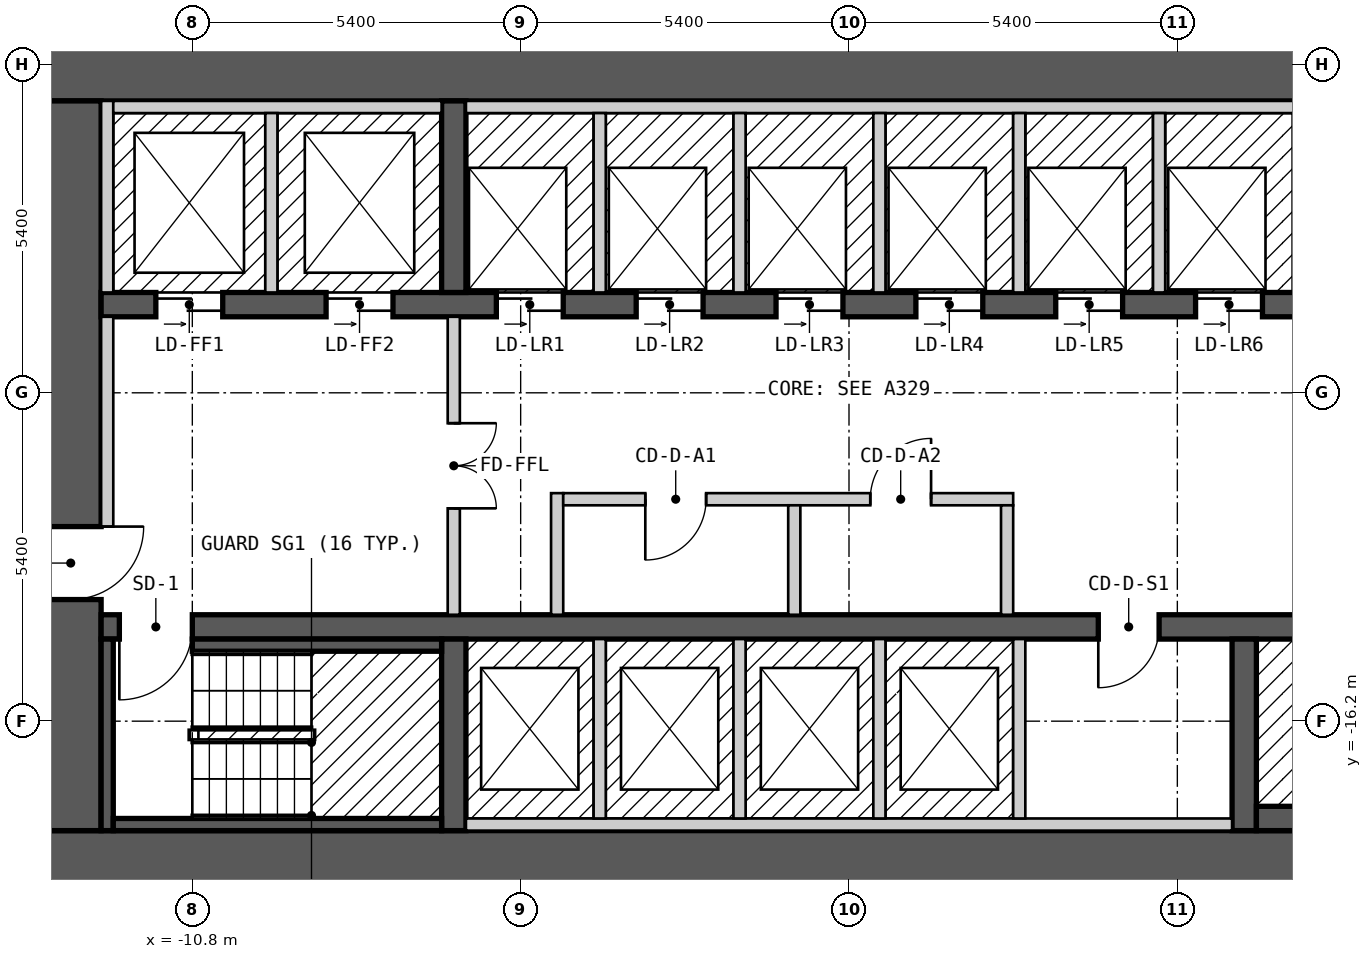
"""IFC4 building model, lengths in metres.
Left out: names, types, materials, properties, quantities, classifications, styles, units other than length and angle.
Written with IfcOpenShell. Run it as: python <this file> out.ifc"""

import sys

from ifc_helpers import new_model, si_unit, direction, frame, frame_2d, origin, place, context, subcontext, project, spatial, rectangle, extrude, element, fill, save


model = new_model("IFC4")
c1 = context("Model", 3, precision=1e-05, world=origin(), true_north=direction((0.0, 1.0)))
c2 = subcontext(c1, "Body", "Model", "MODEL_VIEW")
j1 = project(units=[si_unit("LENGTHUNIT", "METRE"), si_unit("PLANEANGLEUNIT", "RADIAN")], contexts=[c1])
p1 = place(None, origin())
s1 = spatial("IfcSite", under=j1, at=p1, CompositionType="ELEMENT")
p2 = place(p1, origin())
s2 = spatial("IfcBuilding", under=s1, at=p2, CompositionType="ELEMENT")
p3 = place(p2, frame((0.0, 0.0, 102.0)))
s3 = spatial("IfcBuildingStorey", under=s2, at=p3, CompositionType="ELEMENT", Elevation=102.0)
p4 = place(p3, frame((-13.3, -18.5, 0.0), z_axis=(0.0, 0.0, 1.0), x_axis=(1.0, 0.0, 0.0)))
e1 = element("IfcWall", 1, at=p4, inside=s3, PredefinedType="SHEAR", context=c2, shape_type="SweptSolid", body=[
    extrude(rectangle(XDim=26.6, YDim=1.0, at=frame_2d((13.3, 0.0))), origin(), (0.0, 0.0, 1.0), 2.7),
])
p5 = place(p3, frame((-13.3, -5.5, 0.0), z_axis=(0.0, 0.0, 1.0), x_axis=(1.0, 0.0, 0.0)))
e2 = element("IfcWall", 2, at=p5, inside=s3, PredefinedType="SHEAR", context=c2, shape_type="SweptSolid", body=[
    extrude(rectangle(XDim=26.6, YDim=1.0, at=frame_2d((13.3, 0.0))), origin(), (0.0, 0.0, 1.0), 2.7),
])
p6 = place(p5, frame((23.65, 0.0, 0.0)))
e3 = element("IfcOpeningElement", 3, at=p6, cuts=e2, PredefinedType="OPENING", context=c2, shape_type="SweptSolid", body=[
    extrude(rectangle(XDim=1.2, YDim=2.1, at=frame_2d((0.6, 1.05))), frame((0.0, 0.51, 0.0), z_axis=(0.0, -1.0, 0.0), x_axis=(1.0, 0.0, 0.0)), (0.0, 0.0, 1.0), 1.02),
])
p7 = place(p3, frame((-12.8, -18.0, 0.0), z_axis=(0.0, 0.0, 1.0), x_axis=(0.0, 1.0, 0.0)))
e4 = element("IfcWall", 4, at=p7, inside=s3, PredefinedType="SHEAR", context=c2, shape_type="SweptSolid", body=[
    extrude(rectangle(XDim=12.0, YDim=1.0, at=frame_2d((6.0, 0.0))), origin(), (0.0, 0.0, 1.0), 2.7),
])
p8 = place(p7, frame((3.8, 0.0, 0.0)))
e5 = element("IfcOpeningElement", 5, at=p8, cuts=e4, PredefinedType="OPENING", context=c2, shape_type="SweptSolid", body=[
    extrude(rectangle(XDim=1.2, YDim=2.1, at=frame_2d((0.6, 1.05))), frame((0.0, 0.51, 0.0), z_axis=(0.0, -1.0, 0.0), x_axis=(1.0, 0.0, 0.0)), (0.0, 0.0, 1.0), 1.02),
])
p9 = place(p3, frame((-12.3, -14.65, 0.0), z_axis=(0.0, 0.0, 1.0), x_axis=(1.0, 0.0, 0.0)))
e6 = element("IfcWall", 6, at=p9, inside=s3, PredefinedType="SHEAR", context=c2, shape_type="SweptSolid", body=[
    extrude(rectangle(XDim=24.6, YDim=0.4, at=frame_2d((12.3, 0.0))), origin(), (0.0, 0.0, 1.0), 2.7),
])
p10 = place(p9, frame((1.5, 0.0, 0.0), z_axis=(0.0, 0.0, 1.0), x_axis=(-1.0, 0.0, 0.0)))
e7 = element("IfcOpeningElement", 7, at=p10, cuts=e6, PredefinedType="OPENING", context=c2, shape_type="SweptSolid", body=[
    extrude(rectangle(XDim=1.2, YDim=2.1, at=frame_2d((0.6, 1.05))), frame((0.0, 0.21, 0.0), z_axis=(0.0, -1.0, 0.0), x_axis=(1.0, 0.0, 0.0)), (0.0, 0.0, 1.0), 0.42),
])
p11 = place(p9, frame((24.35, 0.0, 0.0), z_axis=(0.0, 0.0, 1.0), x_axis=(-1.0, 0.0, 0.0)))
e8 = element("IfcOpeningElement", 8, at=p11, cuts=e6, PredefinedType="OPENING", context=c2, shape_type="SweptSolid", body=[
    extrude(rectangle(XDim=1.2, YDim=2.1, at=frame_2d((0.6, 1.05))), frame((0.0, 0.21, 0.0), z_axis=(0.0, -1.0, 0.0), x_axis=(1.0, 0.0, 0.0)), (0.0, 0.0, 1.0), 0.42),
])
p12 = place(p9, frame((17.4, 0.0, 0.0), z_axis=(0.0, 0.0, 1.0), x_axis=(-1.0, 0.0, 0.0)))
e9 = element("IfcOpeningElement", 9, at=p12, cuts=e6, PredefinedType="OPENING", context=c2, shape_type="SweptSolid", body=[
    extrude(rectangle(XDim=1.0, YDim=2.1, at=frame_2d((0.5, 1.05))), frame((0.0, 0.21, 0.0), z_axis=(0.0, -1.0, 0.0), x_axis=(1.0, 0.0, 0.0)), (0.0, 0.0, 1.0), 0.42),
])
p13 = place(p3, frame((-12.3, -9.35, 0.0), z_axis=(0.0, 0.0, 1.0), x_axis=(1.0, 0.0, 0.0)))
e10 = element("IfcWall", 10, at=p13, inside=s3, PredefinedType="SHEAR", context=c2, shape_type="SweptSolid", body=[
    extrude(rectangle(XDim=22.5, YDim=0.4, at=frame_2d((11.25, 0.0))), origin(), (0.0, 0.0, 1.0), 2.7),
])
p14 = place(p13, frame((0.9, 0.0, 0.0)))
e11 = element("IfcOpeningElement", 11, at=p14, cuts=e10, PredefinedType="OPENING", context=c2, shape_type="SweptSolid", body=[
    extrude(rectangle(XDim=1.1, YDim=2.1, at=frame_2d((0.55, 1.05))), frame((0.0, 0.21, 0.0), z_axis=(0.0, -1.0, 0.0), x_axis=(1.0, 0.0, 0.0)), (0.0, 0.0, 1.0), 0.42),
])
p15 = place(p13, frame((3.7, 0.0, 0.0)))
e12 = element("IfcOpeningElement", 12, at=p15, cuts=e10, PredefinedType="OPENING", context=c2, shape_type="SweptSolid", body=[
    extrude(rectangle(XDim=1.1, YDim=2.1, at=frame_2d((0.55, 1.05))), frame((0.0, 0.21, 0.0), z_axis=(0.0, -1.0, 0.0), x_axis=(1.0, 0.0, 0.0)), (0.0, 0.0, 1.0), 0.42),
])
p16 = place(p13, frame((6.5, 0.0, 0.0)))
e13 = element("IfcOpeningElement", 13, at=p16, cuts=e10, PredefinedType="OPENING", context=c2, shape_type="SweptSolid", body=[
    extrude(rectangle(XDim=1.1, YDim=2.1, at=frame_2d((0.55, 1.05))), frame((0.0, 0.21, 0.0), z_axis=(0.0, -1.0, 0.0), x_axis=(1.0, 0.0, 0.0)), (0.0, 0.0, 1.0), 0.42),
])
p17 = place(p13, frame((8.8, 0.0, 0.0)))
e14 = element("IfcOpeningElement", 14, at=p17, cuts=e10, PredefinedType="OPENING", context=c2, shape_type="SweptSolid", body=[
    extrude(rectangle(XDim=1.1, YDim=2.1, at=frame_2d((0.55, 1.05))), frame((0.0, 0.21, 0.0), z_axis=(0.0, -1.0, 0.0), x_axis=(1.0, 0.0, 0.0)), (0.0, 0.0, 1.0), 0.42),
])
p18 = place(p13, frame((11.1, 0.0, 0.0)))
e15 = element("IfcOpeningElement", 15, at=p18, cuts=e10, PredefinedType="OPENING", context=c2, shape_type="SweptSolid", body=[
    extrude(rectangle(XDim=1.1, YDim=2.1, at=frame_2d((0.55, 1.05))), frame((0.0, 0.21, 0.0), z_axis=(0.0, -1.0, 0.0), x_axis=(1.0, 0.0, 0.0)), (0.0, 0.0, 1.0), 0.42),
])
p19 = place(p13, frame((13.4, 0.0, 0.0)))
e16 = element("IfcOpeningElement", 16, at=p19, cuts=e10, PredefinedType="OPENING", context=c2, shape_type="SweptSolid", body=[
    extrude(rectangle(XDim=1.1, YDim=2.1, at=frame_2d((0.55, 1.05))), frame((0.0, 0.21, 0.0), z_axis=(0.0, -1.0, 0.0), x_axis=(1.0, 0.0, 0.0)), (0.0, 0.0, 1.0), 0.42),
])
p20 = place(p13, frame((15.7, 0.0, 0.0)))
e17 = element("IfcOpeningElement", 17, at=p20, cuts=e10, PredefinedType="OPENING", context=c2, shape_type="SweptSolid", body=[
    extrude(rectangle(XDim=1.1, YDim=2.1, at=frame_2d((0.55, 1.05))), frame((0.0, 0.21, 0.0), z_axis=(0.0, -1.0, 0.0), x_axis=(1.0, 0.0, 0.0)), (0.0, 0.0, 1.0), 0.42),
])
p21 = place(p13, frame((18.0, 0.0, 0.0)))
e18 = element("IfcOpeningElement", 18, at=p21, cuts=e10, PredefinedType="OPENING", context=c2, shape_type="SweptSolid", body=[
    extrude(rectangle(XDim=1.1, YDim=2.1, at=frame_2d((0.55, 1.05))), frame((0.0, 0.21, 0.0), z_axis=(0.0, -1.0, 0.0), x_axis=(1.0, 0.0, 0.0)), (0.0, 0.0, 1.0), 0.42),
])
p22 = place(p13, frame((20.4, 0.0, 0.0)))
e19 = element("IfcOpeningElement", 19, at=p22, cuts=e10, PredefinedType="OPENING", context=c2, shape_type="SweptSolid", body=[
    extrude(rectangle(XDim=1.1, YDim=2.1, at=frame_2d((0.55, 1.05))), frame((0.0, 0.21, 0.0), z_axis=(0.0, -1.0, 0.0), x_axis=(1.0, 0.0, 0.0)), (0.0, 0.0, 1.0), 0.42),
])
for number, where, z_axis, x_axis in (
    (20, (-6.5, -18.0, 0.0), (0.0, 0.0, 1.0), (0.0, 1.0, 0.0)),
    (21, (6.5, -18.0, 0.0), (0.0, 0.0, 1.0), (0.0, 1.0, 0.0)),
    (22, (-6.5, -9.15, 0.0), (0.0, 0.0, 1.0), (0.0, 1.0, 0.0)),
):
    element("IfcWall", number, at=place(p3, frame(where, z_axis=z_axis, x_axis=x_axis)), inside=s3, PredefinedType="SHEAR", context=c2, shape_type="SweptSolid", body=[
        extrude(rectangle(XDim=3.15, YDim=0.4, at=frame_2d((1.575, 0.0))), origin(), (0.0, 0.0, 1.0), 2.7),
    ])
p23 = place(p3, frame((-12.2, -18.0, 0.0), z_axis=(0.0, 0.0, 1.0), x_axis=(0.0, 1.0, 0.0)))
e23 = element("IfcWall", 23, at=p23, inside=s3, PredefinedType="SOLIDWALL", context=c2, shape_type="SweptSolid", body=[
    extrude(rectangle(XDim=3.15, YDim=0.2, at=frame_2d((1.575, 0.0))), origin(), (0.0, 0.0, 1.0), 2.7),
])
p24 = place(p3, frame((-12.2, -13.0, 0.0), z_axis=(0.0, 0.0, 1.0), x_axis=(0.0, 1.0, 0.0)))
e24 = element("IfcWall", 24, at=p24, inside=s3, PredefinedType="PARTITIONING", context=c2, shape_type="SweptSolid", body=[
    extrude(rectangle(XDim=3.45, YDim=0.2, at=frame_2d((1.725, 0.0))), origin(), (0.0, 0.0, 1.0), 2.7),
])
p25 = place(p3, frame((-12.2, -9.15, 0.0), z_axis=(0.0, 0.0, 1.0), x_axis=(0.0, 1.0, 0.0)))
e25 = element("IfcWall", 25, at=p25, inside=s3, PredefinedType="SOLIDWALL", context=c2, shape_type="SweptSolid", body=[
    extrude(rectangle(XDim=3.15, YDim=0.2, at=frame_2d((1.575, 0.0))), origin(), (0.0, 0.0, 1.0), 2.7),
])
for number, where, z_axis, x_axis in (
    (26, (-12.1, -17.9, 0.0), (0.0, 0.0, 1.0), (1.0, 0.0, 0.0)),
    (27, (-12.1, -6.1, 0.0), (0.0, 0.0, 1.0), (1.0, 0.0, 0.0)),
):
    element("IfcWall", number, at=place(p3, frame(where, z_axis=z_axis, x_axis=x_axis)), inside=s3, PredefinedType="SOLIDWALL", context=c2, shape_type="SweptSolid", body=[
        extrude(rectangle(XDim=5.4, YDim=0.2, at=frame_2d((2.7, 0.0))), origin(), (0.0, 0.0, 1.0), 2.7),
    ])
p26 = place(p3, frame((-10.8, -14.95, 0.0), z_axis=(0.0, 0.0, 1.0), x_axis=(1.0, 0.0, 0.0)))
e28 = element("IfcWall", 28, at=p26, inside=s3, PredefinedType="SOLIDWALL", context=c2, shape_type="SweptSolid", body=[
    extrude(rectangle(XDim=4.1, YDim=0.2, at=frame_2d((2.05, 0.0))), origin(), (0.0, 0.0, 1.0), 2.7),
])
p27 = place(p3, frame((-9.5, -9.15, 0.0), z_axis=(0.0, 0.0, 1.0), x_axis=(0.0, 1.0, 0.0)))
e29 = element("IfcWall", 29, at=p27, inside=s3, PredefinedType="SOLIDWALL", context=c2, shape_type="SweptSolid", body=[
    extrude(rectangle(XDim=2.95, YDim=0.2, at=frame_2d((1.475, 0.0))), origin(), (0.0, 0.0, 1.0), 2.7),
])
p28 = place(p3, frame((-6.5, -14.45, 0.0), z_axis=(0.0, 0.0, 1.0), x_axis=(0.0, 1.0, 0.0)))
e30 = element("IfcWall", 30, at=p28, inside=s3, PredefinedType="PARTITIONING", context=c2, shape_type="SweptSolid", body=[
    extrude(rectangle(XDim=4.9, YDim=0.2, at=frame_2d((2.45, 0.0))), origin(), (0.0, 0.0, 1.0), 2.7),
])
p29 = place(p28, frame((3.15, 0.0, 0.0), z_axis=(0.0, 0.0, 1.0), x_axis=(-1.0, 0.0, 0.0)))
e31 = element("IfcOpeningElement", 31, at=p29, cuts=e30, PredefinedType="OPENING", context=c2, shape_type="SweptSolid", body=[
    extrude(rectangle(XDim=1.4, YDim=2.1, at=frame_2d((0.7, 1.05))), frame((0.0, 0.11, 0.0), z_axis=(0.0, -1.0, 0.0), x_axis=(1.0, 0.0, 0.0)), (0.0, 0.0, 1.0), 0.22),
])
p30 = place(p3, frame((-6.3, -17.9, 0.0), z_axis=(0.0, 0.0, 1.0), x_axis=(1.0, 0.0, 0.0)))
e32 = element("IfcWall", 32, at=p30, inside=s3, PredefinedType="SOLIDWALL", context=c2, shape_type="SweptSolid", body=[
    extrude(rectangle(XDim=12.6, YDim=0.2, at=frame_2d((6.3, 0.0))), origin(), (0.0, 0.0, 1.0), 2.7),
])
p31 = place(p3, frame((-6.3, -6.1, 0.0), z_axis=(0.0, 0.0, 1.0), x_axis=(1.0, 0.0, 0.0)))
e33 = element("IfcWall", 33, at=p31, inside=s3, PredefinedType="SOLIDWALL", context=c2, shape_type="SweptSolid", body=[
    extrude(rectangle(XDim=16.1, YDim=0.2, at=frame_2d((8.05, 0.0))), origin(), (0.0, 0.0, 1.0), 2.7),
])
p32 = place(p3, frame((-4.8, -14.45, 0.0), z_axis=(0.0, 0.0, 1.0), x_axis=(0.0, 1.0, 0.0)))
e34 = element("IfcWall", 34, at=p32, inside=s3, PredefinedType="PARTITIONING", context=c2, shape_type="SweptSolid", body=[
    extrude(rectangle(XDim=2.0, YDim=0.2, at=frame_2d((1.0, 0.0))), origin(), (0.0, 0.0, 1.0), 2.7),
])
p33 = place(p3, frame((-4.7, -12.55, 0.0), z_axis=(0.0, 0.0, 1.0), x_axis=(1.0, 0.0, 0.0)))
e35 = element("IfcWall", 35, at=p33, inside=s3, PredefinedType="PARTITIONING", context=c2, shape_type="SweptSolid", body=[
    extrude(rectangle(XDim=7.4, YDim=0.2, at=frame_2d((3.7, 0.0))), origin(), (0.0, 0.0, 1.0), 2.7),
])
p34 = place(p33, frame((2.35, 0.0, 0.0), z_axis=(0.0, 0.0, 1.0), x_axis=(-1.0, 0.0, 0.0)))
e36 = element("IfcOpeningElement", 36, at=p34, cuts=e35, PredefinedType="OPENING", context=c2, shape_type="SweptSolid", body=[
    extrude(rectangle(XDim=1.0, YDim=2.1, at=frame_2d((0.5, 1.05))), frame((0.0, 0.11, 0.0), z_axis=(0.0, -1.0, 0.0), x_axis=(1.0, 0.0, 0.0)), (0.0, 0.0, 1.0), 0.22),
])
p35 = place(p33, frame((6.05, 0.0, 0.0), z_axis=(0.0, 0.0, 1.0), x_axis=(-1.0, 0.0, 0.0)))
e37 = element("IfcOpeningElement", 37, at=p35, cuts=e35, PredefinedType="OPENING", context=c2, shape_type="SweptSolid", body=[
    extrude(rectangle(XDim=1.0, YDim=2.1, at=frame_2d((0.5, 1.05))), frame((0.0, 0.11, 0.0), z_axis=(0.0, -1.0, 0.0), x_axis=(1.0, 0.0, 0.0)), (0.0, 0.0, 1.0), 0.22),
])
for number, where, z_axis, x_axis in (
    (38, (-4.1, -17.8, 0.0), (0.0, 0.0, 1.0), (0.0, 1.0, 0.0)),
    (39, (-4.1, -9.15, 0.0), (0.0, 0.0, 1.0), (0.0, 1.0, 0.0)),
    (40, (-1.8, -17.8, 0.0), (0.0, 0.0, 1.0), (0.0, 1.0, 0.0)),
    (41, (-1.8, -9.15, 0.0), (0.0, 0.0, 1.0), (0.0, 1.0, 0.0)),
):
    element("IfcWall", number, at=place(p3, frame(where, z_axis=z_axis, x_axis=x_axis)), inside=s3, PredefinedType="SOLIDWALL", context=c2, shape_type="SweptSolid", body=[
        extrude(rectangle(XDim=2.95, YDim=0.2, at=frame_2d((1.475, 0.0))), origin(), (0.0, 0.0, 1.0), 2.7),
    ])
p36 = place(p3, frame((-0.9, -14.45, 0.0), z_axis=(0.0, 0.0, 1.0), x_axis=(0.0, 1.0, 0.0)))
e42 = element("IfcWall", 42, at=p36, inside=s3, PredefinedType="PARTITIONING", context=c2, shape_type="SweptSolid", body=[
    extrude(rectangle(XDim=1.8, YDim=0.2, at=frame_2d((0.9, 0.0))), origin(), (0.0, 0.0, 1.0), 2.7),
])
for number, where, z_axis, x_axis in (
    (43, (0.5, -17.8, 0.0), (0.0, 0.0, 1.0), (0.0, 1.0, 0.0)),
    (44, (0.5, -9.15, 0.0), (0.0, 0.0, 1.0), (0.0, 1.0, 0.0)),
):
    element("IfcWall", number, at=place(p3, frame(where, z_axis=z_axis, x_axis=x_axis)), inside=s3, PredefinedType="SOLIDWALL", context=c2, shape_type="SweptSolid", body=[
        extrude(rectangle(XDim=2.95, YDim=0.2, at=frame_2d((1.475, 0.0))), origin(), (0.0, 0.0, 1.0), 2.7),
    ])
p37 = place(p3, frame((2.6, -14.45, 0.0), z_axis=(0.0, 0.0, 1.0), x_axis=(0.0, 1.0, 0.0)))
e45 = element("IfcWall", 45, at=p37, inside=s3, PredefinedType="PARTITIONING", context=c2, shape_type="SweptSolid", body=[
    extrude(rectangle(XDim=1.8, YDim=0.2, at=frame_2d((0.9, 0.0))), origin(), (0.0, 0.0, 1.0), 2.7),
])
for number, where, z_axis, x_axis in (
    (46, (2.8, -17.8, 0.0), (0.0, 0.0, 1.0), (0.0, 1.0, 0.0)),
    (47, (2.8, -9.15, 0.0), (0.0, 0.0, 1.0), (0.0, 1.0, 0.0)),
    (48, (5.1, -9.15, 0.0), (0.0, 0.0, 1.0), (0.0, 1.0, 0.0)),
):
    element("IfcWall", number, at=place(p3, frame(where, z_axis=z_axis, x_axis=x_axis)), inside=s3, PredefinedType="SOLIDWALL", context=c2, shape_type="SweptSolid", body=[
        extrude(rectangle(XDim=2.95, YDim=0.2, at=frame_2d((1.475, 0.0))), origin(), (0.0, 0.0, 1.0), 2.7),
    ])
p38 = place(p3, frame((6.7, -17.8, 0.0), z_axis=(0.0, 0.0, 1.0), x_axis=(1.0, 0.0, 0.0)))
e49 = element("IfcWall", 49, at=p38, inside=s3, PredefinedType="SOLIDWALL", context=c2, shape_type="SweptSolid", body=[
    extrude(rectangle(XDim=5.6, YDim=0.4, at=frame_2d((2.8, 0.0))), origin(), (0.0, 0.0, 1.0), 2.7),
])
p39 = place(p3, frame((7.4, -9.15, 0.0), z_axis=(0.0, 0.0, 1.0), x_axis=(0.0, 1.0, 0.0)))
e50 = element("IfcWall", 50, at=p39, inside=s3, PredefinedType="SOLIDWALL", context=c2, shape_type="SweptSolid", body=[
    extrude(rectangle(XDim=2.95, YDim=0.2, at=frame_2d((1.475, 0.0))), origin(), (0.0, 0.0, 1.0), 2.7),
])
p40 = place(p14, origin())
e51 = element("IfcDoor", 51, at=p40, inside=s3, OperationType="DOUBLE_DOOR_SLIDING", PredefinedType="DOOR", context=c2, shape_type="SweptSolid", body=[
    extrude(rectangle(XDim=1.1, YDim=2.1, at=frame_2d((0.55, 1.05))), frame((0.0, 0.025, 0.0), z_axis=(0.0, -1.0, 0.0), x_axis=(1.0, 0.0, 0.0)), (0.0, 0.0, 1.0), 0.05),
])
fill(e11, e51)
p41 = place(p15, origin())
e52 = element("IfcDoor", 52, at=p41, inside=s3, OperationType="DOUBLE_DOOR_SLIDING", PredefinedType="DOOR", context=c2, shape_type="SweptSolid", body=[
    extrude(rectangle(XDim=1.1, YDim=2.1, at=frame_2d((0.55, 1.05))), frame((0.0, 0.025, 0.0), z_axis=(0.0, -1.0, 0.0), x_axis=(1.0, 0.0, 0.0)), (0.0, 0.0, 1.0), 0.05),
])
fill(e12, e52)
p42 = place(p16, origin())
e53 = element("IfcDoor", 53, at=p42, inside=s3, OperationType="DOUBLE_DOOR_SLIDING", PredefinedType="DOOR", context=c2, shape_type="SweptSolid", body=[
    extrude(rectangle(XDim=1.1, YDim=2.1, at=frame_2d((0.55, 1.05))), frame((0.0, 0.025, 0.0), z_axis=(0.0, -1.0, 0.0), x_axis=(1.0, 0.0, 0.0)), (0.0, 0.0, 1.0), 0.05),
])
fill(e13, e53)
p43 = place(p17, origin())
e54 = element("IfcDoor", 54, at=p43, inside=s3, OperationType="DOUBLE_DOOR_SLIDING", PredefinedType="DOOR", context=c2, shape_type="SweptSolid", body=[
    extrude(rectangle(XDim=1.1, YDim=2.1, at=frame_2d((0.55, 1.05))), frame((0.0, 0.025, 0.0), z_axis=(0.0, -1.0, 0.0), x_axis=(1.0, 0.0, 0.0)), (0.0, 0.0, 1.0), 0.05),
])
fill(e14, e54)
p44 = place(p18, origin())
e55 = element("IfcDoor", 55, at=p44, inside=s3, OperationType="DOUBLE_DOOR_SLIDING", PredefinedType="DOOR", context=c2, shape_type="SweptSolid", body=[
    extrude(rectangle(XDim=1.1, YDim=2.1, at=frame_2d((0.55, 1.05))), frame((0.0, 0.025, 0.0), z_axis=(0.0, -1.0, 0.0), x_axis=(1.0, 0.0, 0.0)), (0.0, 0.0, 1.0), 0.05),
])
fill(e15, e55)
p45 = place(p19, origin())
e56 = element("IfcDoor", 56, at=p45, inside=s3, OperationType="DOUBLE_DOOR_SLIDING", PredefinedType="DOOR", context=c2, shape_type="SweptSolid", body=[
    extrude(rectangle(XDim=1.1, YDim=2.1, at=frame_2d((0.55, 1.05))), frame((0.0, 0.025, 0.0), z_axis=(0.0, -1.0, 0.0), x_axis=(1.0, 0.0, 0.0)), (0.0, 0.0, 1.0), 0.05),
])
fill(e16, e56)
p46 = place(p20, origin())
e57 = element("IfcDoor", 57, at=p46, inside=s3, OperationType="DOUBLE_DOOR_SLIDING", PredefinedType="DOOR", context=c2, shape_type="SweptSolid", body=[
    extrude(rectangle(XDim=1.1, YDim=2.1, at=frame_2d((0.55, 1.05))), frame((0.0, 0.025, 0.0), z_axis=(0.0, -1.0, 0.0), x_axis=(1.0, 0.0, 0.0)), (0.0, 0.0, 1.0), 0.05),
])
fill(e17, e57)
p47 = place(p21, origin())
e58 = element("IfcDoor", 58, at=p47, inside=s3, OperationType="DOUBLE_DOOR_SLIDING", PredefinedType="DOOR", context=c2, shape_type="SweptSolid", body=[
    extrude(rectangle(XDim=1.1, YDim=2.1, at=frame_2d((0.55, 1.05))), frame((0.0, 0.025, 0.0), z_axis=(0.0, -1.0, 0.0), x_axis=(1.0, 0.0, 0.0)), (0.0, 0.0, 1.0), 0.05),
])
fill(e18, e58)
p48 = place(p10, origin())
e59 = element("IfcDoor", 59, at=p48, inside=s3, OperationType="SINGLE_SWING_RIGHT", PredefinedType="DOOR", context=c2, shape_type="SweptSolid", body=[
    extrude(rectangle(XDim=1.2, YDim=2.1, at=frame_2d((0.6, 1.05))), frame((0.0, 0.025, 0.0), z_axis=(0.0, -1.0, 0.0), x_axis=(1.0, 0.0, 0.0)), (0.0, 0.0, 1.0), 0.05),
])
fill(e7, e59)
p49 = place(p8, origin())
e60 = element("IfcDoor", 60, at=p49, inside=s3, OperationType="SINGLE_SWING_RIGHT", PredefinedType="DOOR", context=c2, shape_type="SweptSolid", body=[
    extrude(rectangle(XDim=1.2, YDim=2.1, at=frame_2d((0.6, 1.05))), frame((0.0, 0.025, 0.0), z_axis=(0.0, -1.0, 0.0), x_axis=(1.0, 0.0, 0.0)), (0.0, 0.0, 1.0), 0.05),
])
fill(e5, e60)
p50 = place(p29, origin())
e61 = element("IfcDoor", 61, at=p50, inside=s3, OperationType="DOUBLE_DOOR_SINGLE_SWING", PredefinedType="DOOR", context=c2, shape_type="SweptSolid", body=[
    extrude(rectangle(XDim=1.4, YDim=2.1, at=frame_2d((0.7, 1.05))), frame((0.0, 0.025, 0.0), z_axis=(0.0, -1.0, 0.0), x_axis=(1.0, 0.0, 0.0)), (0.0, 0.0, 1.0), 0.05),
])
fill(e31, e61)
p51 = place(p34, origin())
e62 = element("IfcDoor", 62, at=p51, inside=s3, OperationType="SINGLE_SWING_RIGHT", PredefinedType="DOOR", context=c2, shape_type="SweptSolid", body=[
    extrude(rectangle(XDim=1.0, YDim=2.1, at=frame_2d((0.5, 1.05))), frame((0.0, 0.025, 0.0), z_axis=(0.0, -1.0, 0.0), x_axis=(1.0, 0.0, 0.0)), (0.0, 0.0, 1.0), 0.05),
])
fill(e36, e62)
p52 = place(p35, origin())
e63 = element("IfcDoor", 63, at=p52, inside=s3, OperationType="SINGLE_SWING_LEFT", PredefinedType="DOOR", context=c2, shape_type="SweptSolid", body=[
    extrude(rectangle(XDim=1.0, YDim=2.1, at=frame_2d((0.5, 1.05))), frame((0.0, 0.025, 0.0), z_axis=(0.0, -1.0, 0.0), x_axis=(1.0, 0.0, 0.0)), (0.0, 0.0, 1.0), 0.05),
])
fill(e37, e63)
p53 = place(p12, origin())
e64 = element("IfcDoor", 64, at=p53, inside=s3, OperationType="SINGLE_SWING_RIGHT", PredefinedType="DOOR", context=c2, shape_type="SweptSolid", body=[
    extrude(rectangle(XDim=1.0, YDim=2.1, at=frame_2d((0.5, 1.05))), frame((0.0, 0.025, 0.0), z_axis=(0.0, -1.0, 0.0), x_axis=(1.0, 0.0, 0.0)), (0.0, 0.0, 1.0), 0.05),
])
fill(e9, e64)
save(model, sys.argv[1])
